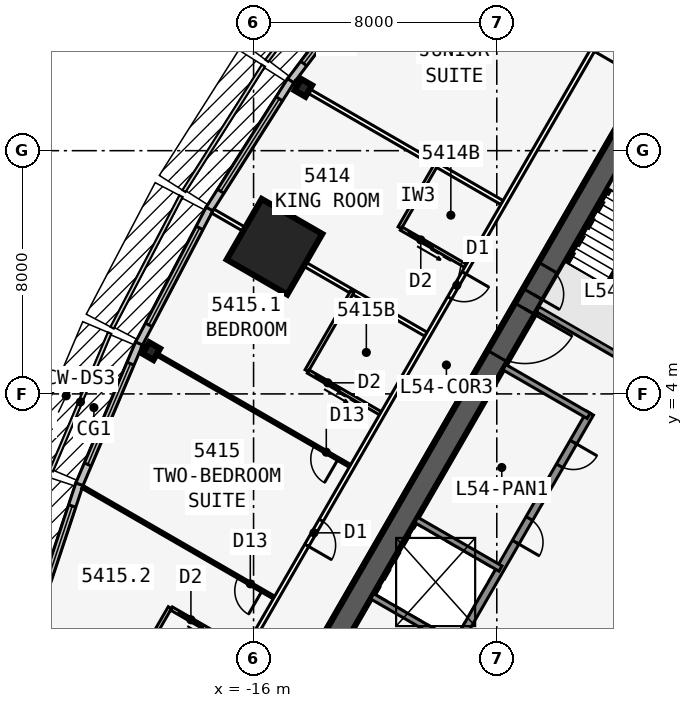
"""IFC4 building model, lengths in metres.
Left out: names, types, materials, properties, quantities, classifications, styles, units other than length and angle.
Written with IfcOpenShell. Run it as: python <this file> out.ifc"""

import sys

from ifc_helpers import new_model, si_unit, direction, frame, frame_2d, origin, origin_2d, place, context, subcontext, project, spatial, rectangle, i_section, extrude, element, fill, save


model = new_model("IFC4")
c1 = context("Model", 3, precision=1e-05, world=origin(), true_north=direction((0.0, 1.0)))
c2 = subcontext(c1, "Body", "Model", "MODEL_VIEW")
j1 = project(units=[si_unit("LENGTHUNIT", "METRE"), si_unit("PLANEANGLEUNIT", "RADIAN")], contexts=[c1])
p1 = place(None, origin())
s1 = spatial("IfcSite", under=j1, at=p1, CompositionType="ELEMENT")
p2 = place(p1, origin())
s2 = spatial("IfcBuilding", under=s1, at=p2, CompositionType="ELEMENT")
p3 = place(p2, frame((0.0, 0.0, 204.5)))
s3 = spatial("IfcBuildingStorey", under=s2, at=p3, CompositionType="ELEMENT", Elevation=204.5)
p4 = place(p3, frame((0.0, 19.052, 0.0), z_axis=(0.0, 0.0, 1.0), x_axis=(-0.499999749417, -0.866025548458, 0.0)))
e1 = element("IfcWall", 1, at=p4, inside=s3, PredefinedType="SHEAR", context=c2, shape_type="SweptSolid", body=[
    extrude(rectangle(XDim=33.0, YDim=0.75, at=frame_2d((16.5, 0.0))), origin(), (0.0, 0.0, 1.0), 3.6),
])
p5 = place(p4, frame((14.15, 0.0, 0.0)))
e2 = element("IfcOpeningElement", 2, at=p5, cuts=e1, PredefinedType="OPENING", context=c2, shape_type="SweptSolid", body=[
    extrude(rectangle(XDim=1.8, YDim=2.13, at=frame_2d((0.9, 1.065))), frame((0.0, 0.385, 0.0), z_axis=(0.0, -1.0, 0.0), x_axis=(1.0, 0.0, 0.0)), (0.0, 0.0, 1.0), 0.77),
])
p6 = place(p4, frame((12.6, 0.0, 0.0)))
e3 = element("IfcOpeningElement", 3, at=p6, cuts=e1, PredefinedType="OPENING", context=c2, shape_type="SweptSolid", body=[
    extrude(rectangle(XDim=1.0, YDim=2.13, at=frame_2d((0.5, 1.065))), frame((0.0, 0.385, 0.0), z_axis=(0.0, -1.0, 0.0), x_axis=(1.0, 0.0, 0.0)), (0.0, 0.0, 1.0), 0.77),
])
p7 = place(p3, frame((-4.929, 3.365, 0.0), z_axis=(0.0, 0.0, 1.0), x_axis=(-0.499991433582, -0.866030349552, 0.0)))
e4 = element("IfcWall", 4, at=p7, inside=s3, PredefinedType="SOLIDWALL", context=c2, shape_type="SweptSolid", body=[
    extrude(rectangle(XDim=10.633, YDim=0.25, at=frame_2d((5.316, 0.0))), origin(), (0.0, 0.0, 1.0), 3.435),
])
p8 = place(p7, frame((9.164, 0.0, 0.0)))
e5 = element("IfcOpeningElement", 5, at=p8, cuts=e4, PredefinedType="OPENING", context=c2, shape_type="SweptSolid", body=[
    extrude(rectangle(XDim=0.9, YDim=2.13, at=frame_2d((0.45, 1.065))), frame((0.0, 0.135, 0.0), z_axis=(0.0, -1.0, 0.0), x_axis=(1.0, 0.0, 0.0)), (0.0, 0.0, 1.0), 0.27),
])
p9 = place(p7, frame((1.1, 0.0, 0.0)))
e6 = element("IfcOpeningElement", 6, at=p9, cuts=e4, PredefinedType="OPENING", context=c2, shape_type="SweptSolid", body=[
    extrude(rectangle(XDim=0.9, YDim=2.13, at=frame_2d((0.45, 1.065))), frame((0.0, 0.135, 0.0), z_axis=(0.0, -1.0, 0.0), x_axis=(1.0, 0.0, 0.0)), (0.0, 0.0, 1.0), 0.27),
])
p10 = place(p7, frame((4.0, 0.0, 0.0)))
e7 = element("IfcOpeningElement", 7, at=p10, cuts=e4, PredefinedType="OPENING", context=c2, shape_type="SweptSolid", body=[
    extrude(rectangle(XDim=0.9, YDim=2.13, at=frame_2d((0.45, 1.065))), frame((0.0, 0.135, 0.0), z_axis=(0.0, -1.0, 0.0), x_axis=(1.0, 0.0, 0.0)), (0.0, 0.0, 1.0), 0.27),
])
for number, where, z_axis, x_axis in (
    (8, (-3.879, 5.184, 0.0), (0.0, 0.0, 1.0), (-0.866, 0.5, 0.0)),
    (9, (-4.979, 3.279, 0.0), (0.0, 0.0, 1.0), (-0.866, 0.5, 0.0)),
    (10, (-7.879, -1.744, 0.0), (0.0, 0.0, 1.0), (-0.866, 0.5, 0.0)),
):
    element("IfcWall", number, at=place(p3, frame(where, z_axis=z_axis, x_axis=x_axis)), inside=s3, PredefinedType="SOLIDWALL", context=c2, shape_type="SweptSolid", body=[
        extrude(rectangle(XDim=3.2, YDim=0.2, at=frame_2d((1.6, 0.0))), origin(), (0.0, 0.0, 1.0), 3.435),
    ])
p11 = place(p3, frame((-9.329, -4.256, 0.0), z_axis=(0.0, 0.0, 1.0), x_axis=(-0.866022944154, 0.50000426018, 0.0)))
e11 = element("IfcWall", 11, at=p11, inside=s3, PredefinedType="SOLIDWALL", context=c2, shape_type="SweptSolid", body=[
    extrude(rectangle(XDim=3.2, YDim=0.2, at=frame_2d((1.6, 0.0))), origin(), (0.0, 0.0, 1.0), 3.435),
])
for number, where, z_axis, x_axis in (
    (12, (-14.363, 14.066, 0.0), (0.0, 0.0, 1.0), (-0.866, 0.5, 0.0)),
    (13, (-19.363, 5.406, 0.0), (0.0, 0.0, 1.0), (-0.866, 0.5, 0.0)),
):
    element("IfcColumn", number, at=place(p3, frame(where, z_axis=z_axis, x_axis=x_axis)), inside=s3, PredefinedType="COLUMN", context=c2, shape_type="SweptSolid", body=[
        extrude(i_section(OverallWidth=0.411, OverallDepth=0.434, WebThickness=0.036, FlangeThickness=0.057, at=origin_2d()), origin(), (0.0, 0.0, 1.0), 3.6),
    ])
p12 = place(p3, frame((-15.312, 8.84, 0.0), z_axis=(0.0, 0.0, 1.0), x_axis=(-0.866025403784, 0.5, 0.0)))
e14 = element("IfcColumn", 14, at=p12, inside=s3, PredefinedType="COLUMN", context=c2, shape_type="SweptSolid", body=[
    extrude(rectangle(XDim=2.3, YDim=2.3, at=origin_2d()), origin(), (0.0, 0.0, 1.0), 3.6),
])
p13 = place(p3, frame((-11.748, 18.312, 0.0), z_axis=(0.0, 0.0, 1.0), x_axis=(-0.602408653511, -0.798187831388, 0.0)))
e15 = element("IfcWall", 15, at=p13, inside=s3, PredefinedType="STANDARD", context=c2, shape_type="SweptSolid", body=[
    extrude(rectangle(XDim=5.038, YDim=0.25, at=frame_2d((2.519, 0.0))), origin(), (0.0, 0.0, 1.0), 3.435),
])
p14 = place(p13, frame((0.719, 0.0, 0.45)))
e16 = element("IfcOpeningElement", 16, at=p14, cuts=e15, PredefinedType="OPENING", context=c2, shape_type="SweptSolid", body=[
    extrude(rectangle(XDim=3.6, YDim=2.6, at=frame_2d((1.8, 1.3))), frame((0.0, 0.135, 0.0), z_axis=(0.0, -1.0, 0.0), x_axis=(1.0, 0.0, 0.0)), (0.0, 0.0, 1.0), 0.27),
])
p15 = place(p3, frame((-14.777, 14.299, 0.0), z_axis=(0.0, 0.0, 1.0), x_axis=(-0.535220361449, -0.844712474568, 0.0)))
e17 = element("IfcWall", 17, at=p15, inside=s3, PredefinedType="STANDARD", context=c2, shape_type="SweptSolid", body=[
    extrude(rectangle(XDim=5.004, YDim=0.25, at=frame_2d((2.502, 0.0))), origin(), (0.0, 0.0, 1.0), 3.435),
])
p16 = place(p15, frame((0.702, 0.0, 0.45)))
e18 = element("IfcOpeningElement", 18, at=p16, cuts=e17, PredefinedType="OPENING", context=c2, shape_type="SweptSolid", body=[
    extrude(rectangle(XDim=3.6, YDim=2.6, at=frame_2d((1.8, 1.3))), frame((0.0, 0.135, 0.0), z_axis=(0.0, -1.0, 0.0), x_axis=(1.0, 0.0, 0.0)), (0.0, 0.0, 1.0), 0.27),
])
p17 = place(p3, frame((-17.45, 10.081, 0.0), z_axis=(0.0, 0.0, 1.0), x_axis=(-0.463976002579, -0.885847768542, 0.0)))
e19 = element("IfcWall", 19, at=p17, inside=s3, PredefinedType="STANDARD", context=c2, shape_type="SweptSolid", body=[
    extrude(rectangle(XDim=5.004, YDim=0.25, at=frame_2d((2.502, 0.0))), origin(), (0.0, 0.0, 1.0), 3.435),
])
p18 = place(p17, frame((0.702, 0.0, 0.45)))
e20 = element("IfcOpeningElement", 20, at=p18, cuts=e19, PredefinedType="OPENING", context=c2, shape_type="SweptSolid", body=[
    extrude(rectangle(XDim=3.6, YDim=2.6, at=frame_2d((1.8, 1.3))), frame((0.0, 0.135, 0.0), z_axis=(0.0, -1.0, 0.0), x_axis=(1.0, 0.0, 0.0)), (0.0, 0.0, 1.0), 0.27),
])
p19 = place(p3, frame((-19.768, 5.657, 0.0), z_axis=(0.0, 0.0, 1.0), x_axis=(-0.390096809471, -0.920773848044, 0.0)))
e21 = element("IfcWall", 21, at=p19, inside=s3, PredefinedType="STANDARD", context=c2, shape_type="SweptSolid", body=[
    extrude(rectangle(XDim=5.038, YDim=0.25, at=frame_2d((2.519, 0.0))), origin(), (0.0, 0.0, 1.0), 3.435),
])
p20 = place(p19, frame((0.719, 0.0, 0.45)))
e22 = element("IfcOpeningElement", 22, at=p20, cuts=e21, PredefinedType="OPENING", context=c2, shape_type="SweptSolid", body=[
    extrude(rectangle(XDim=3.6, YDim=2.6, at=frame_2d((1.8, 1.3))), frame((0.0, 0.135, 0.0), z_axis=(0.0, -1.0, 0.0), x_axis=(1.0, 0.0, 0.0)), (0.0, 0.0, 1.0), 0.27),
])
p21 = place(p3, frame((-21.729, 1.028, 0.0), z_axis=(0.0, 0.0, 1.0), x_axis=(-0.315108478109, -0.949055660656, 0.0)))
e23 = element("IfcWall", 23, at=p21, inside=s3, PredefinedType="STANDARD", context=c2, shape_type="SweptSolid", body=[
    extrude(rectangle(XDim=5.105, YDim=0.25, at=frame_2d((2.552, 0.0))), origin(), (0.0, 0.0, 1.0), 3.435),
])
p22 = place(p21, frame((0.752, 0.0, 0.45)))
e24 = element("IfcOpeningElement", 24, at=p22, cuts=e23, PredefinedType="OPENING", context=c2, shape_type="SweptSolid", body=[
    extrude(rectangle(XDim=3.6, YDim=2.6, at=frame_2d((1.8, 1.3))), frame((0.0, 0.135, 0.0), z_axis=(0.0, -1.0, 0.0), x_axis=(1.0, 0.0, 0.0)), (0.0, 0.0, 1.0), 0.27),
])
p23 = place(p3, frame((-0.425, 22.966, 0.0), z_axis=(0.0, 0.0, 1.0), x_axis=(-0.500000265775, -0.866025250339, 0.0)))
e25 = element("IfcWall", 25, at=p23, inside=s3, PredefinedType="PARTITIONING", context=c2, shape_type="SweptSolid", body=[
    extrude(rectangle(XDim=39.354, YDim=0.15, at=frame_2d((19.677, 0.0))), origin(), (0.0, 0.0, 1.0), 3.435),
])
p24 = place(p23, frame((1.102, 0.0, 0.0)))
e26 = element("IfcOpeningElement", 26, at=p24, cuts=e25, PredefinedType="OPENING", context=c2, shape_type="SweptSolid", body=[
    extrude(rectangle(XDim=0.95, YDim=2.13, at=frame_2d((0.475, 1.065))), frame((0.0, 0.085, 0.0), z_axis=(0.0, -1.0, 0.0), x_axis=(1.0, 0.0, 0.0)), (0.0, 0.0, 1.0), 0.17),
])
p25 = place(p23, frame((7.902, 0.0, 0.0)))
e27 = element("IfcOpeningElement", 27, at=p25, cuts=e25, PredefinedType="OPENING", context=c2, shape_type="SweptSolid", body=[
    extrude(rectangle(XDim=0.95, YDim=2.13, at=frame_2d((0.475, 1.065))), frame((0.0, 0.085, 0.0), z_axis=(0.0, -1.0, 0.0), x_axis=(1.0, 0.0, 0.0)), (0.0, 0.0, 1.0), 0.17),
])
p26 = place(p23, frame((17.302, 0.0, 0.0)))
e28 = element("IfcOpeningElement", 28, at=p26, cuts=e25, PredefinedType="OPENING", context=c2, shape_type="SweptSolid", body=[
    extrude(rectangle(XDim=0.95, YDim=2.13, at=frame_2d((0.475, 1.065))), frame((0.0, 0.085, 0.0), z_axis=(0.0, -1.0, 0.0), x_axis=(1.0, 0.0, 0.0)), (0.0, 0.0, 1.0), 0.17),
])
p27 = place(p23, frame((26.702, 0.0, 0.0)))
e29 = element("IfcOpeningElement", 29, at=p27, cuts=e25, PredefinedType="OPENING", context=c2, shape_type="SweptSolid", body=[
    extrude(rectangle(XDim=0.95, YDim=2.13, at=frame_2d((0.475, 1.065))), frame((0.0, 0.085, 0.0), z_axis=(0.0, -1.0, 0.0), x_axis=(1.0, 0.0, 0.0)), (0.0, 0.0, 1.0), 0.17),
])
p28 = place(p23, frame((37.302, 0.0, 0.0)))
e30 = element("IfcOpeningElement", 30, at=p28, cuts=e25, PredefinedType="OPENING", context=c2, shape_type="SweptSolid", body=[
    extrude(rectangle(XDim=0.95, YDim=2.13, at=frame_2d((0.475, 1.065))), frame((0.0, 0.085, 0.0), z_axis=(0.0, -1.0, 0.0), x_axis=(1.0, 0.0, 0.0)), (0.0, 0.0, 1.0), 0.17),
])
p29 = place(p3, frame((-7.829, 10.293, 0.0), z_axis=(0.0, 0.0, 1.0), x_axis=(-0.866030558329, 0.49999107196, 0.0)))
e31 = element("IfcWall", 31, at=p29, inside=s3, PredefinedType="PARTITIONING", context=c2, shape_type="SweptSolid", body=[
    extrude(rectangle(XDim=7.894, YDim=0.15, at=frame_2d((3.947, 0.0))), origin(), (0.0, 0.0, 1.0), 2.589),
])
p30 = place(p3, frame((-10.329, 5.963, 0.0), z_axis=(0.0, 0.0, 1.0), x_axis=(-0.866016460812, 0.500015489362, 0.0)))
e32 = element("IfcWall", 32, at=p30, inside=s3, PredefinedType="PARTITIONING", context=c2, shape_type="SweptSolid", body=[
    extrude(rectangle(XDim=8.101, YDim=0.15, at=frame_2d((4.051, 0.0))), origin(), (0.0, 0.0, 1.0), 2.589),
])
p31 = place(p3, frame((-12.829, 1.633, 0.0), z_axis=(0.0, 0.0, 1.0), x_axis=(-0.866030558329, 0.49999107196, 0.0)))
e33 = element("IfcWall", 33, at=p31, inside=s3, PredefinedType="PARTITIONING", context=c2, shape_type="SweptSolid", body=[
    extrude(rectangle(XDim=7.894, YDim=0.1, at=frame_2d((3.947, 0.0))), origin(), (0.0, 0.0, 1.0), 2.589),
])
p32 = place(p31, frame((0.45, 0.0, 0.0)))
e34 = element("IfcOpeningElement", 34, at=p32, cuts=e33, PredefinedType="OPENING", context=c2, shape_type="SweptSolid", body=[
    extrude(rectangle(XDim=0.9, YDim=2.13, at=frame_2d((0.45, 1.065))), frame((0.0, 0.06, 0.0), z_axis=(0.0, -1.0, 0.0), x_axis=(1.0, 0.0, 0.0)), (0.0, 0.0, 1.0), 0.12),
])
p33 = place(p3, frame((-15.329, -2.697, 0.0), z_axis=(0.0, 0.0, 1.0), x_axis=(-0.866032413668, 0.499987858329, 0.0)))
e35 = element("IfcWall", 35, at=p33, inside=s3, PredefinedType="PARTITIONING", context=c2, shape_type="SweptSolid", body=[
    extrude(rectangle(XDim=7.273, YDim=0.1, at=frame_2d((3.636, 0.0))), origin(), (0.0, 0.0, 1.0), 2.589),
])
p34 = place(p33, frame((0.45, 0.0, 0.0)))
e36 = element("IfcOpeningElement", 36, at=p34, cuts=e35, PredefinedType="OPENING", context=c2, shape_type="SweptSolid", body=[
    extrude(rectangle(XDim=0.9, YDim=2.13, at=frame_2d((0.45, 1.065))), frame((0.0, 0.06, 0.0), z_axis=(0.0, -1.0, 0.0), x_axis=(1.0, 0.0, 0.0)), (0.0, 0.0, 1.0), 0.12),
])
p35 = place(p3, frame((-9.993, 11.543, 0.0), z_axis=(0.0, 0.0, 1.0), x_axis=(-0.500077600433, -0.865980596518, 0.0)))
e37 = element("IfcWall", 37, at=p35, inside=s3, PredefinedType="PLUMBINGWALL", context=c2, shape_type="SweptSolid", body=[
    extrude(rectangle(XDim=2.4, YDim=0.12, at=frame_2d((1.2, 0.0))), origin(), (0.0, 0.0, 1.0), 3.435),
])
p36 = place(p3, frame((-9.029, 8.215, 0.0), z_axis=(0.0, 0.0, 1.0), x_axis=(-0.866023955769, 0.500002508028, 0.0)))
e38 = element("IfcWall", 38, at=p36, inside=s3, PredefinedType="PLUMBINGWALL", context=c2, shape_type="SweptSolid", body=[
    extrude(rectangle(XDim=2.44, YDim=0.12, at=frame_2d((1.22, 0.0))), origin(), (0.0, 0.0, 1.0), 3.435),
])
p37 = place(p36, frame((1.25, 0.0, 0.0)))
e39 = element("IfcOpeningElement", 39, at=p37, cuts=e38, PredefinedType="OPENING", context=c2, shape_type="SweptSolid", body=[
    extrude(rectangle(XDim=0.9, YDim=2.13, at=frame_2d((0.45, 1.065))), frame((0.0, 0.07, 0.0), z_axis=(0.0, -1.0, 0.0), x_axis=(1.0, 0.0, 0.0)), (0.0, 0.0, 1.0), 0.14),
])
p38 = place(p3, frame((-12.753, 7.363, 0.0), z_axis=(0.0, 0.0, 1.0), x_axis=(-0.50002537861, -0.866010750942, 0.0)))
e40 = element("IfcWall", 40, at=p38, inside=s3, PredefinedType="PLUMBINGWALL", context=c2, shape_type="SweptSolid", body=[
    extrude(rectangle(XDim=3.0, YDim=0.12, at=frame_2d((1.5, 0.0))), origin(), (0.0, 0.0, 1.0), 3.435),
])
p39 = place(p3, frame((-11.829, 3.365, 0.0), z_axis=(0.0, 0.0, 1.0), x_axis=(-0.865997131366, 0.500048966069, 0.0)))
e41 = element("IfcWall", 41, at=p39, inside=s3, PredefinedType="PLUMBINGWALL", context=c2, shape_type="SweptSolid", body=[
    extrude(rectangle(XDim=2.74, YDim=0.12, at=frame_2d((1.37, 0.0))), origin(), (0.0, 0.0, 1.0), 3.435),
])
p40 = place(p39, frame((1.55, 0.0, 0.0)))
e42 = element("IfcOpeningElement", 42, at=p40, cuts=e41, PredefinedType="OPENING", context=c2, shape_type="SweptSolid", body=[
    extrude(rectangle(XDim=0.9, YDim=2.13, at=frame_2d((0.45, 1.065))), frame((0.0, 0.07, 0.0), z_axis=(0.0, -1.0, 0.0), x_axis=(1.0, 0.0, 0.0)), (0.0, 0.0, 1.0), 0.14),
])
p41 = place(p3, frame((-18.753, -3.029, 0.0), z_axis=(0.0, 0.0, 1.0), x_axis=(-0.50002537861, -0.866010750942, 0.0)))
e43 = element("IfcWall", 43, at=p41, inside=s3, PredefinedType="PLUMBINGWALL", context=c2, shape_type="SweptSolid", body=[
    extrude(rectangle(XDim=3.0, YDim=0.12, at=frame_2d((1.5, 0.0))), origin(), (0.0, 0.0, 1.0), 3.435),
])
p42 = place(p3, frame((-16.329, -4.429, 0.0), z_axis=(0.0, 0.0, 1.0), x_axis=(-0.865997131366, 0.500048966069, 0.0)))
e44 = element("IfcWall", 44, at=p42, inside=s3, PredefinedType="PLUMBINGWALL", context=c2, shape_type="SweptSolid", body=[
    extrude(rectangle(XDim=2.74, YDim=0.12, at=frame_2d((1.37, 0.0))), origin(), (0.0, 0.0, 1.0), 3.435),
])
p43 = place(p42, frame((1.55, 0.0, 0.0)))
e45 = element("IfcOpeningElement", 45, at=p43, cuts=e44, PredefinedType="OPENING", context=c2, shape_type="SweptSolid", body=[
    extrude(rectangle(XDim=0.9, YDim=2.13, at=frame_2d((0.45, 1.065))), frame((0.0, 0.07, 0.0), z_axis=(0.0, -1.0, 0.0), x_axis=(1.0, 0.0, 0.0)), (0.0, 0.0, 1.0), 0.14),
])
p44 = place(p3, frame((-2.988, 9.978, 0.0), z_axis=(0.0, 0.0, 1.0), x_axis=(-0.499992232847, -0.866029888106, 0.0)))
e46 = element("IfcWall", 46, at=p44, inside=s3, PredefinedType="SOLIDWALL", context=c2, shape_type="SweptSolid", body=[
    extrude(rectangle(XDim=2.794, YDim=0.1, at=frame_2d((1.397, 0.0))), origin(), (0.0, 0.0, 1.0), 3.6),
])
p45 = place(p14, origin())
e47 = element("IfcWindow", 47, at=p45, inside=s3, PartitioningType="SINGLE_PANEL", PredefinedType="WINDOW", context=c2, shape_type="SweptSolid", body=[
    extrude(rectangle(XDim=3.6, YDim=2.6, at=frame_2d((1.8, 1.3))), frame((0.0, 0.03, 0.0), z_axis=(0.0, -1.0, 0.0), x_axis=(1.0, 0.0, 0.0)), (0.0, 0.0, 1.0), 0.06),
])
fill(e16, e47)
p46 = place(p16, origin())
e48 = element("IfcWindow", 48, at=p46, inside=s3, PartitioningType="SINGLE_PANEL", PredefinedType="WINDOW", context=c2, shape_type="SweptSolid", body=[
    extrude(rectangle(XDim=3.6, YDim=2.6, at=frame_2d((1.8, 1.3))), frame((0.0, 0.03, 0.0), z_axis=(0.0, -1.0, 0.0), x_axis=(1.0, 0.0, 0.0)), (0.0, 0.0, 1.0), 0.06),
])
fill(e18, e48)
p47 = place(p18, origin())
e49 = element("IfcWindow", 49, at=p47, inside=s3, PartitioningType="SINGLE_PANEL", PredefinedType="WINDOW", context=c2, shape_type="SweptSolid", body=[
    extrude(rectangle(XDim=3.6, YDim=2.6, at=frame_2d((1.8, 1.3))), frame((0.0, 0.03, 0.0), z_axis=(0.0, -1.0, 0.0), x_axis=(1.0, 0.0, 0.0)), (0.0, 0.0, 1.0), 0.06),
])
fill(e20, e49)
p48 = place(p20, origin())
e50 = element("IfcWindow", 50, at=p48, inside=s3, PartitioningType="SINGLE_PANEL", PredefinedType="WINDOW", context=c2, shape_type="SweptSolid", body=[
    extrude(rectangle(XDim=3.6, YDim=2.6, at=frame_2d((1.8, 1.3))), frame((0.0, 0.03, 0.0), z_axis=(0.0, -1.0, 0.0), x_axis=(1.0, 0.0, 0.0)), (0.0, 0.0, 1.0), 0.06),
])
fill(e22, e50)
p49 = place(p22, origin())
e51 = element("IfcWindow", 51, at=p49, inside=s3, PartitioningType="SINGLE_PANEL", PredefinedType="WINDOW", context=c2, shape_type="SweptSolid", body=[
    extrude(rectangle(XDim=3.6, YDim=2.6, at=frame_2d((1.8, 1.3))), frame((0.0, 0.03, 0.0), z_axis=(0.0, -1.0, 0.0), x_axis=(1.0, 0.0, 0.0)), (0.0, 0.0, 1.0), 0.06),
])
fill(e24, e51)
p50 = place(p32, origin())
e52 = element("IfcDoor", 52, at=p50, inside=s3, OperationType="SINGLE_SWING_LEFT", PredefinedType="DOOR", context=c2, shape_type="SweptSolid", body=[
    extrude(rectangle(XDim=0.9, YDim=2.13, at=frame_2d((0.45, 1.065))), frame((0.0, 0.025, 0.0), z_axis=(0.0, -1.0, 0.0), x_axis=(1.0, 0.0, 0.0)), (0.0, 0.0, 1.0), 0.05),
])
fill(e34, e52)
p51 = place(p34, origin())
e53 = element("IfcDoor", 53, at=p51, inside=s3, OperationType="SINGLE_SWING_LEFT", PredefinedType="DOOR", context=c2, shape_type="SweptSolid", body=[
    extrude(rectangle(XDim=0.9, YDim=2.13, at=frame_2d((0.45, 1.065))), frame((0.0, 0.025, 0.0), z_axis=(0.0, -1.0, 0.0), x_axis=(1.0, 0.0, 0.0)), (0.0, 0.0, 1.0), 0.05),
])
fill(e36, e53)
p52 = place(p37, origin())
e54 = element("IfcDoor", 54, at=p52, inside=s3, OperationType="SLIDING_TO_LEFT", PredefinedType="DOOR", context=c2, shape_type="SweptSolid", body=[
    extrude(rectangle(XDim=0.9, YDim=2.13, at=frame_2d((0.45, 1.065))), frame((0.0, 0.025, 0.0), z_axis=(0.0, -1.0, 0.0), x_axis=(1.0, 0.0, 0.0)), (0.0, 0.0, 1.0), 0.05),
])
fill(e39, e54)
p53 = place(p26, origin())
e55 = element("IfcDoor", 55, at=p53, inside=s3, OperationType="SINGLE_SWING_LEFT", PredefinedType="DOOR", context=c2, shape_type="SweptSolid", body=[
    extrude(rectangle(XDim=0.95, YDim=2.13, at=frame_2d((0.475, 1.065))), frame((0.0, 0.025, 0.0), z_axis=(0.0, -1.0, 0.0), x_axis=(1.0, 0.0, 0.0)), (0.0, 0.0, 1.0), 0.05),
])
fill(e28, e55)
p54 = place(p40, origin())
e56 = element("IfcDoor", 56, at=p54, inside=s3, OperationType="SLIDING_TO_LEFT", PredefinedType="DOOR", context=c2, shape_type="SweptSolid", body=[
    extrude(rectangle(XDim=0.9, YDim=2.13, at=frame_2d((0.45, 1.065))), frame((0.0, 0.025, 0.0), z_axis=(0.0, -1.0, 0.0), x_axis=(1.0, 0.0, 0.0)), (0.0, 0.0, 1.0), 0.05),
])
fill(e42, e56)
p55 = place(p27, origin())
e57 = element("IfcDoor", 57, at=p55, inside=s3, OperationType="SINGLE_SWING_RIGHT", PredefinedType="DOOR", context=c2, shape_type="SweptSolid", body=[
    extrude(rectangle(XDim=0.95, YDim=2.13, at=frame_2d((0.475, 1.065))), frame((0.0, 0.025, 0.0), z_axis=(0.0, -1.0, 0.0), x_axis=(1.0, 0.0, 0.0)), (0.0, 0.0, 1.0), 0.05),
])
fill(e29, e57)
p56 = place(p43, origin())
e58 = element("IfcDoor", 58, at=p56, inside=s3, OperationType="SLIDING_TO_LEFT", PredefinedType="DOOR", context=c2, shape_type="SweptSolid", body=[
    extrude(rectangle(XDim=0.9, YDim=2.13, at=frame_2d((0.45, 1.065))), frame((0.0, 0.025, 0.0), z_axis=(0.0, -1.0, 0.0), x_axis=(1.0, 0.0, 0.0)), (0.0, 0.0, 1.0), 0.05),
])
fill(e45, e58)
p57 = place(p5, origin())
e59 = element("IfcDoor", 59, at=p57, inside=s3, OperationType="DOUBLE_DOOR_SINGLE_SWING", PredefinedType="DOOR", context=c2, shape_type="SweptSolid", body=[
    extrude(rectangle(XDim=1.8, YDim=2.13, at=frame_2d((0.9, 1.065))), frame((0.0, 0.025, 0.0), z_axis=(0.0, -1.0, 0.0), x_axis=(1.0, 0.0, 0.0)), (0.0, 0.0, 1.0), 0.05),
])
fill(e2, e59)
p58 = place(p6, origin())
e60 = element("IfcDoor", 60, at=p58, inside=s3, OperationType="SINGLE_SWING_RIGHT", PredefinedType="DOOR", context=c2, shape_type="SweptSolid", body=[
    extrude(rectangle(XDim=1.0, YDim=2.13, at=frame_2d((0.5, 1.065))), frame((0.0, 0.025, 0.0), z_axis=(0.0, -1.0, 0.0), x_axis=(1.0, 0.0, 0.0)), (0.0, 0.0, 1.0), 0.05),
])
fill(e3, e60)
p59 = place(p9, origin())
e61 = element("IfcDoor", 61, at=p59, inside=s3, OperationType="SINGLE_SWING_LEFT", PredefinedType="DOOR", context=c2, shape_type="SweptSolid", body=[
    extrude(rectangle(XDim=0.9, YDim=2.13, at=frame_2d((0.45, 1.065))), frame((0.0, 0.025, 0.0), z_axis=(0.0, -1.0, 0.0), x_axis=(1.0, 0.0, 0.0)), (0.0, 0.0, 1.0), 0.05),
])
fill(e6, e61)
p60 = place(p10, origin())
e62 = element("IfcDoor", 62, at=p60, inside=s3, OperationType="SINGLE_SWING_RIGHT", PredefinedType="DOOR", context=c2, shape_type="SweptSolid", body=[
    extrude(rectangle(XDim=0.9, YDim=2.13, at=frame_2d((0.45, 1.065))), frame((0.0, 0.025, 0.0), z_axis=(0.0, -1.0, 0.0), x_axis=(1.0, 0.0, 0.0)), (0.0, 0.0, 1.0), 0.05),
])
fill(e7, e62)
save(model, sys.argv[1])
